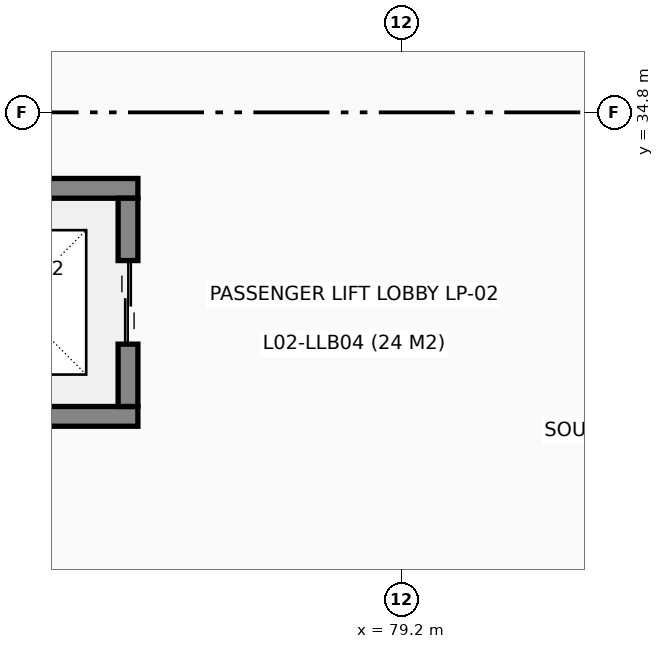
"""IFC4 building model, lengths in metres.
Left out: names, types, materials, properties, quantities, classifications, styles, units other than length and angle.
Written with IfcOpenShell. Run it as: python <this file> out.ifc"""

import sys

from ifc_helpers import new_model, si_unit, direction, frame, frame_2d, origin, place, context, subcontext, project, spatial, rectangle, extrude, element, fill, save


model = new_model("IFC4")
c1 = context("Model", 3, precision=1e-05, world=origin(), true_north=direction((0.0, 1.0)))
c2 = subcontext(c1, "Body", "Model", "MODEL_VIEW")
j1 = project(units=[si_unit("LENGTHUNIT", "METRE"), si_unit("PLANEANGLEUNIT", "RADIAN")], contexts=[c1])
p1 = place(None, origin())
s1 = spatial("IfcSite", under=j1, at=p1, CompositionType="ELEMENT")
p2 = place(p1, origin())
s2 = spatial("IfcBuilding", under=s1, at=p2, CompositionType="ELEMENT")
p3 = place(p2, frame((0.0, 0.0, 9.6)))
s3 = spatial("IfcBuildingStorey", under=s2, at=p3, CompositionType="ELEMENT", Elevation=9.6)
for number, where, z_axis, x_axis in (
    (1, (72.47, 30.8, 0.0), (0.0, 0.0, 1.0), (1.0, 0.0, 0.0)),
    (2, (72.47, 33.8, 0.0), (0.0, 0.0, 1.0), (1.0, 0.0, 0.0)),
):
    element("IfcWall", number, at=place(p3, frame(where, z_axis=z_axis, x_axis=x_axis)), inside=s3, PredefinedType="SHEAR", context=c2, shape_type="SweptSolid", body=[
        extrude(rectangle(XDim=3.26, YDim=0.26, at=frame_2d((1.63, 0.0))), origin(), (0.0, 0.0, 1.0), 4.56),
    ])
p4 = place(p3, frame((75.6, 30.93, 0.0), z_axis=(0.0, 0.0, 1.0), x_axis=(0.0, 1.0, 0.0)))
e3 = element("IfcWall", 3, at=p4, inside=s3, PredefinedType="SHEAR", context=c2, shape_type="SweptSolid", body=[
    extrude(rectangle(XDim=2.74, YDim=0.26, at=frame_2d((1.37, 0.0))), origin(), (0.0, 0.0, 1.0), 4.56),
])
p5 = place(p4, frame((0.82, 0.0, 0.0)))
e4 = element("IfcOpeningElement", 4, at=p5, cuts=e3, PredefinedType="OPENING", context=c2, shape_type="SweptSolid", body=[
    extrude(rectangle(XDim=1.1, YDim=2.15, at=frame_2d((0.55, 1.075))), frame((0.0, 0.14, 0.0), z_axis=(0.0, -1.0, 0.0), x_axis=(1.0, 0.0, 0.0)), (0.0, 0.0, 1.0), 0.28),
])
p6 = place(p5, origin())
e5 = element("IfcDoor", 5, at=p6, inside=s3, OperationType="DOUBLE_DOOR_SLIDING", PredefinedType="DOOR", context=c2, shape_type="SweptSolid", body=[
    extrude(rectangle(XDim=1.1, YDim=2.15, at=frame_2d((0.55, 1.075))), frame((0.0, 0.025, 0.0), z_axis=(0.0, -1.0, 0.0), x_axis=(1.0, 0.0, 0.0)), (0.0, 0.0, 1.0), 0.05),
])
fill(e4, e5)
save(model, sys.argv[1])
